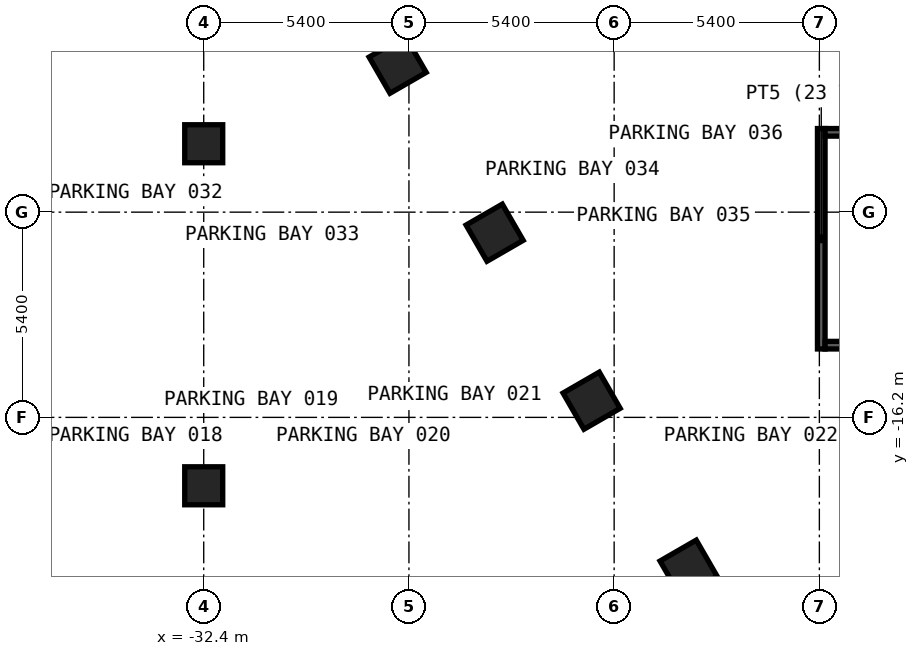
"""IFC4 building model, lengths in metres.
Left out: names, types, materials, properties, quantities, classifications, styles, units other than length and angle.
Written with IfcOpenShell. Run it as: python <this file> out.ifc"""

import sys

from ifc_helpers import new_model, si_unit, direction, frame, frame_2d, origin, origin_2d, place, context, subcontext, project, spatial, rectangle, extrude, element, save


model = new_model("IFC4")
c1 = context("Model", 3, precision=1e-05, world=origin(), true_north=direction((0.0, 1.0)))
c2 = subcontext(c1, "Body", "Model", "MODEL_VIEW")
j1 = project(units=[si_unit("LENGTHUNIT", "METRE"), si_unit("PLANEANGLEUNIT", "RADIAN")], contexts=[c1])
p1 = place(None, origin())
s1 = spatial("IfcSite", under=j1, at=p1, CompositionType="ELEMENT")
p2 = place(p1, origin())
s2 = spatial("IfcBuilding", under=s1, at=p2, CompositionType="ELEMENT")
p3 = place(p2, frame((0.0, 0.0, -8.4)))
s3 = spatial("IfcBuildingStorey", under=s2, at=p3, CompositionType="ELEMENT", Elevation=-8.4)
for number, where, z_axis, x_axis in (
    (1, (-27.297, -6.921, -0.35), (0.0, 0.0, 1.0), (0.5, -0.866, 0.0)),
    (2, (-24.745, -11.341, -0.35), (0.0, 0.0, 1.0), (0.5, -0.866, 0.0)),
    (3, (-22.193, -15.761, -0.35), (0.0, 0.0, 1.0), (0.5, -0.866, 0.0)),
    (4, (-19.641, -20.181, -0.35), (0.0, 0.0, 1.0), (0.5, -0.866, 0.0)),
):
    element("IfcColumn", number, at=place(p3, frame(where, z_axis=z_axis, x_axis=x_axis)), inside=s3, PredefinedType="COLUMN", context=c2, shape_type="SweptSolid", body=[
        extrude(rectangle(XDim=1.1, YDim=1.1, at=origin_2d()), origin(), (0.0, 0.0, 1.0), 4.55),
    ])
for number, where, z_axis, x_axis in (
    (5, (-32.4, -18.0, -0.35), (0.0, 0.0, 1.0), (1.0, 0.0, 0.0)),
    (6, (-32.4, -9.0, -0.35), (0.0, 0.0, 1.0), (1.0, 0.0, 0.0)),
):
    element("IfcColumn", number, at=place(p3, frame(where, z_axis=z_axis, x_axis=x_axis)), inside=s3, PredefinedType="COLUMN", context=c2, shape_type="SweptSolid", body=[
        extrude(rectangle(XDim=1.0, YDim=1.0, at=origin_2d()), origin(), (0.0, 0.0, 1.0), 4.55),
    ])
p4 = place(p3, frame((-16.15, -14.4, 0.0), z_axis=(0.0, 0.0, 1.0), x_axis=(0.0, 1.0, 0.0)))
e7 = element("IfcWall", 7, at=p4, inside=s3, PredefinedType="SOLIDWALL", context=c2, shape_type="SweptSolid", body=[
    extrude(rectangle(XDim=5.8, YDim=0.2, at=frame_2d((2.9, 0.0))), origin(), (0.0, 0.0, 1.0), 3.85),
])
for number, where, z_axis, x_axis in (
    (8, (-16.05, -14.3, 0.0), (0.0, 0.0, 1.0), (1.0, 0.0, 0.0)),
    (9, (-16.05, -8.7, 0.0), (0.0, 0.0, 1.0), (1.0, 0.0, 0.0)),
):
    element("IfcWall", number, at=place(p3, frame(where, z_axis=z_axis, x_axis=x_axis)), inside=s3, PredefinedType="SOLIDWALL", context=c2, shape_type="SweptSolid", body=[
        extrude(rectangle(XDim=2.75, YDim=0.2, at=frame_2d((1.375, 0.0))), origin(), (0.0, 0.0, 1.0), 3.85),
    ])
save(model, sys.argv[1])
